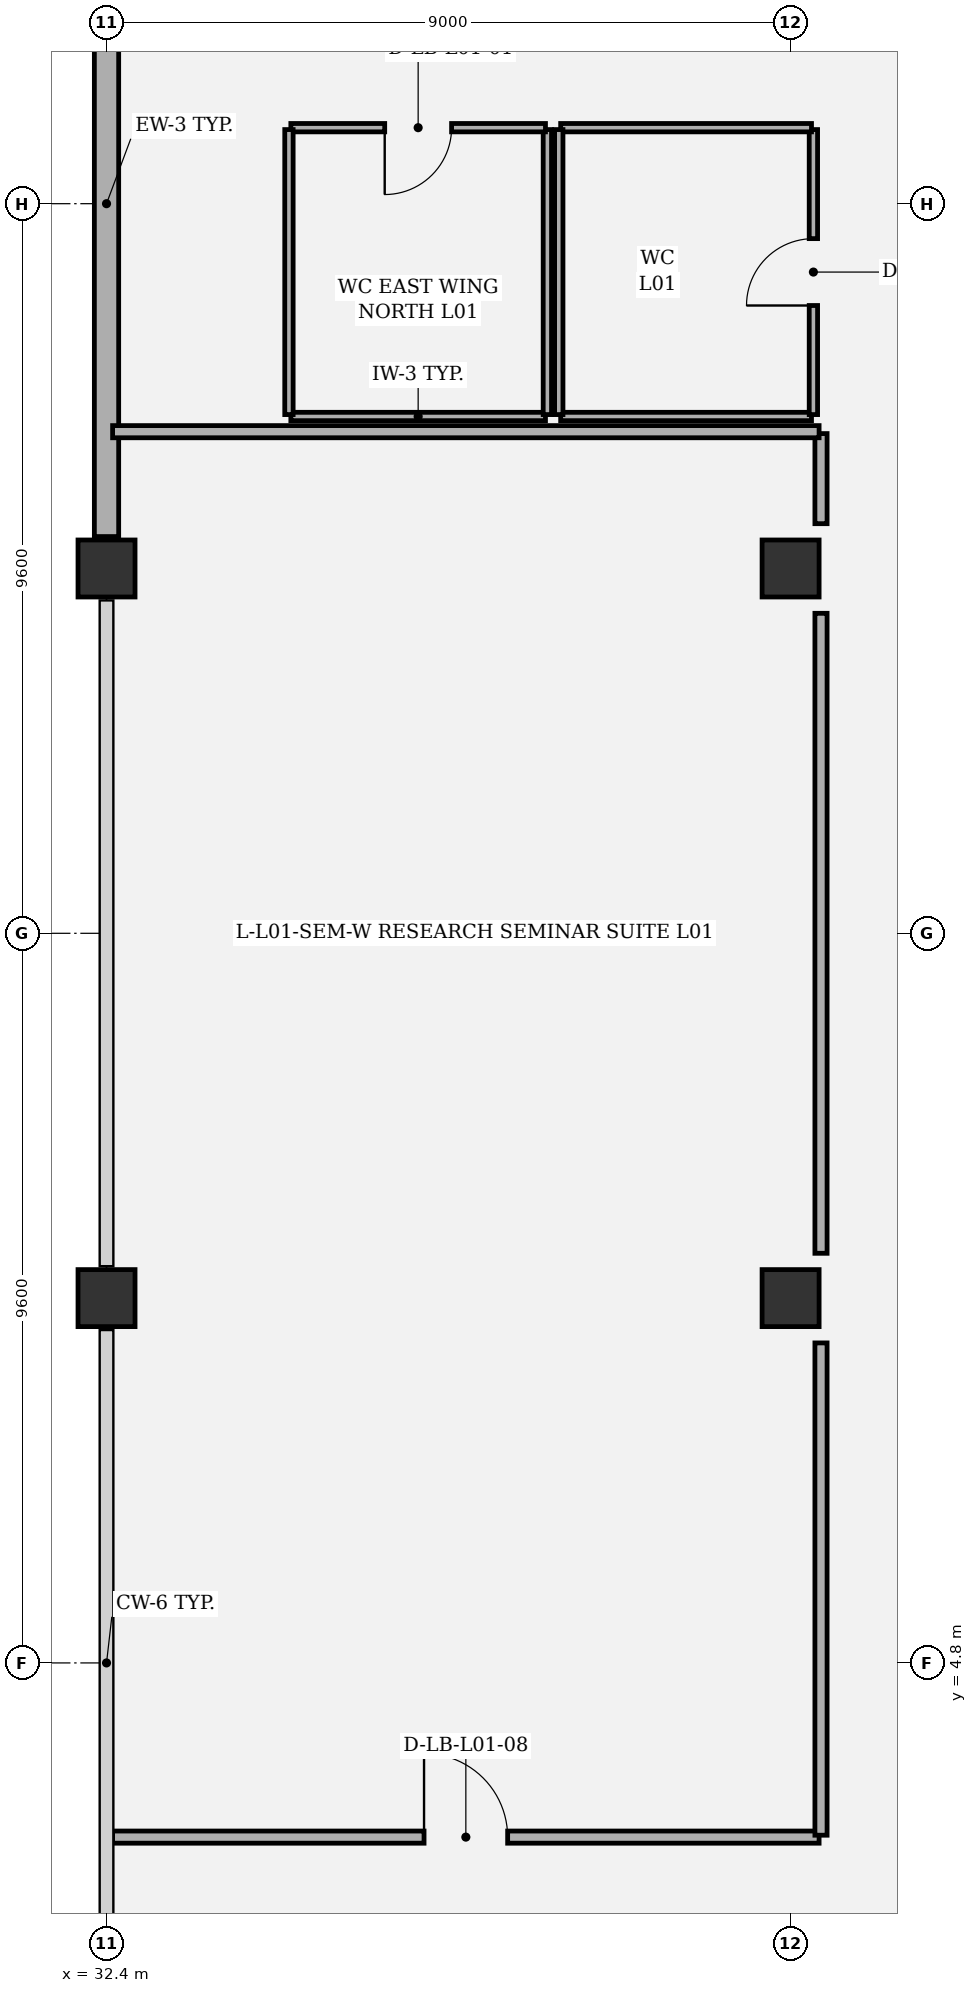
"""IFC4 building model, lengths in metres.
Left out: names, types, materials, properties, quantities, classifications, styles, units other than length and angle.
Written with IfcOpenShell. Run it as: python <this file> out.ifc"""

import sys

from ifc_helpers import new_model, si_unit, direction, frame, frame_2d, origin, origin_2d, place, context, subcontext, project, spatial, rectangle, extrude, element, fill, save


model = new_model("IFC4")
c1 = context("Model", 3, precision=1e-05, world=origin(), true_north=direction((0.0, 1.0)))
c2 = subcontext(c1, "Body", "Model", "MODEL_VIEW")
j1 = project(units=[si_unit("LENGTHUNIT", "METRE"), si_unit("PLANEANGLEUNIT", "RADIAN")], contexts=[c1])
p1 = place(None, origin())
s1 = spatial("IfcSite", under=j1, at=p1, CompositionType="ELEMENT")
p2 = place(p1, origin())
s2 = spatial("IfcBuilding", under=s1, at=p2, CompositionType="ELEMENT")
p3 = place(p2, frame((0.0, 0.0, 6.6)))
s3 = spatial("IfcBuildingStorey", under=s2, at=p3, CompositionType="ELEMENT", Elevation=6.6)
for number, where, z_axis, x_axis in (
    (1, (32.4, 9.6, 0.0), (0.0, 0.0, 1.0), (1.0, 0.0, 0.0)),
    (2, (32.4, 19.2, 0.0), (0.0, 0.0, 1.0), (1.0, 0.0, 0.0)),
    (3, (41.4, 9.6, 0.0), (0.0, 0.0, 1.0), (1.0, 0.0, 0.0)),
    (4, (41.4, 19.2, 0.0), (0.0, 0.0, 1.0), (1.0, 0.0, 0.0)),
):
    element("IfcColumn", number, at=place(p3, frame(where, z_axis=z_axis, x_axis=x_axis)), inside=s3, PredefinedType="COLUMN", context=c2, shape_type="SweptSolid", body=[
        extrude(rectangle(XDim=0.75, YDim=0.75, at=origin_2d()), origin(), (0.0, 0.0, 1.0), 5.4),
    ])
p4 = place(p3, frame((32.4, 19.62, 0.0), z_axis=(0.0, 0.0, 1.0), x_axis=(0.0, 1.0, 0.0)))
e5 = element("IfcWall", 5, at=p4, inside=s3, PredefinedType="SOLIDWALL", context=c2, shape_type="SweptSolid", body=[
    extrude(rectangle(XDim=8.76, YDim=0.32, at=frame_2d((4.38, 0.0))), origin(), (0.0, 0.0, 1.0), 4.337),
])
p5 = place(p3, frame((34.825, 21.2, 0.0), z_axis=(0.0, 0.0, 1.0), x_axis=(1.0, 0.0, 0.0)))
e6 = element("IfcWall", 6, at=p5, inside=s3, PredefinedType="PARTITIONING", context=c2, shape_type="SweptSolid", body=[
    extrude(rectangle(XDim=3.35, YDim=0.11, at=frame_2d((1.675, 0.0))), origin(), (0.0, 0.0, 1.0), 5.14),
])
p6 = place(p3, frame((38.2, 21.225, 0.0), z_axis=(0.0, 0.0, 1.0), x_axis=(0.0, 1.0, 0.0)))
e7 = element("IfcWall", 7, at=p6, inside=s3, PredefinedType="PARTITIONING", context=c2, shape_type="SweptSolid", body=[
    extrude(rectangle(XDim=3.75, YDim=0.11, at=frame_2d((1.875, 0.0))), origin(), (0.0, 0.0, 1.0), 5.14),
])
p7 = place(p3, frame((38.175, 25.0, 0.0), z_axis=(0.0, 0.0, 1.0), x_axis=(-1.0, 0.0, 0.0)))
e8 = element("IfcWall", 8, at=p7, inside=s3, PredefinedType="PARTITIONING", context=c2, shape_type="SweptSolid", body=[
    extrude(rectangle(XDim=3.35, YDim=0.11, at=frame_2d((1.675, 0.0))), origin(), (0.0, 0.0, 1.0), 5.14),
])
p8 = place(p7, frame((1.235, 0.0, 0.0)))
e9 = element("IfcOpeningElement", 9, at=p8, cuts=e8, PredefinedType="OPENING", context=c2, shape_type="SweptSolid", body=[
    extrude(rectangle(XDim=0.88, YDim=2.1, at=frame_2d((0.44, 1.05))), frame((0.0, 0.065, 0.0), z_axis=(0.0, -1.0, 0.0), x_axis=(1.0, 0.0, 0.0)), (0.0, 0.0, 1.0), 0.13),
])
p9 = place(p3, frame((34.8, 24.975, 0.0), z_axis=(0.0, 0.0, 1.0), x_axis=(0.0, -1.0, 0.0)))
e10 = element("IfcWall", 10, at=p9, inside=s3, PredefinedType="PARTITIONING", context=c2, shape_type="SweptSolid", body=[
    extrude(rectangle(XDim=3.75, YDim=0.11, at=frame_2d((1.875, 0.0))), origin(), (0.0, 0.0, 1.0), 5.14),
])
p10 = place(p3, frame((38.375, 21.2, 0.0), z_axis=(0.0, 0.0, 1.0), x_axis=(1.0, 0.0, 0.0)))
e11 = element("IfcWall", 11, at=p10, inside=s3, PredefinedType="PARTITIONING", context=c2, shape_type="SweptSolid", body=[
    extrude(rectangle(XDim=3.3, YDim=0.11, at=frame_2d((1.65, 0.0))), origin(), (0.0, 0.0, 1.0), 5.14),
])
p11 = place(p3, frame((41.7, 21.225, 0.0), z_axis=(0.0, 0.0, 1.0), x_axis=(0.0, 1.0, 0.0)))
e12 = element("IfcWall", 12, at=p11, inside=s3, PredefinedType="PARTITIONING", context=c2, shape_type="SweptSolid", body=[
    extrude(rectangle(XDim=3.75, YDim=0.11, at=frame_2d((1.875, 0.0))), origin(), (0.0, 0.0, 1.0), 4.494),
])
p12 = place(p11, frame((1.435, 0.0, 0.0)))
e13 = element("IfcOpeningElement", 13, at=p12, cuts=e12, PredefinedType="OPENING", context=c2, shape_type="SweptSolid", body=[
    extrude(rectangle(XDim=0.88, YDim=2.1, at=frame_2d((0.44, 1.05))), frame((0.0, 0.065, 0.0), z_axis=(0.0, -1.0, 0.0), x_axis=(1.0, 0.0, 0.0)), (0.0, 0.0, 1.0), 0.13),
])
p13 = place(p3, frame((41.675, 25.0, 0.0), z_axis=(0.0, 0.0, 1.0), x_axis=(-1.0, 0.0, 0.0)))
e14 = element("IfcWall", 14, at=p13, inside=s3, PredefinedType="PARTITIONING", context=c2, shape_type="SweptSolid", body=[
    extrude(rectangle(XDim=3.3, YDim=0.11, at=frame_2d((1.65, 0.0))), origin(), (0.0, 0.0, 1.0), 5.14),
])
p14 = place(p3, frame((38.35, 24.975, 0.0), z_axis=(0.0, 0.0, 1.0), x_axis=(0.0, -1.0, 0.0)))
e15 = element("IfcWall", 15, at=p14, inside=s3, PredefinedType="PARTITIONING", context=c2, shape_type="SweptSolid", body=[
    extrude(rectangle(XDim=3.75, YDim=0.11, at=frame_2d((1.875, 0.0))), origin(), (0.0, 0.0, 1.0), 5.14),
])
p15 = place(p3, frame((32.48, 2.508, 0.0), z_axis=(0.0, 0.0, 1.0), x_axis=(1.0, 0.0, 0.0)))
e16 = element("IfcWall", 16, at=p15, inside=s3, PredefinedType="PARTITIONING", context=c2, shape_type="SweptSolid", body=[
    extrude(rectangle(XDim=9.295, YDim=0.16, at=frame_2d((4.647, 0.0))), origin(), (0.0, 0.0, 1.0), 4.653),
])
p16 = place(p15, frame((4.097, 0.0, 0.0)))
e17 = element("IfcOpeningElement", 17, at=p16, cuts=e16, PredefinedType="OPENING", context=c2, shape_type="SweptSolid", body=[
    extrude(rectangle(XDim=1.1, YDim=2.15, at=frame_2d((0.55, 1.075))), frame((0.0, 0.09, 0.0), z_axis=(0.0, -1.0, 0.0), x_axis=(1.0, 0.0, 0.0)), (0.0, 0.0, 1.0), 0.18),
])
p17 = place(p3, frame((41.8, 2.533, 0.0), z_axis=(0.0, 0.0, 1.0), x_axis=(0.0, 1.0, 0.0)))
e18 = element("IfcWall", 18, at=p17, inside=s3, PredefinedType="PARTITIONING", context=c2, shape_type="SweptSolid", body=[
    extrude(rectangle(XDim=6.477, YDim=0.16, at=frame_2d((3.239, 0.0))), origin(), (0.0, 0.0, 1.0), 5.14),
])
p18 = place(p3, frame((41.8, 10.19, 0.0), z_axis=(0.0, 0.0, 1.0), x_axis=(0.0, 1.0, 0.0)))
e19 = element("IfcWall", 19, at=p18, inside=s3, PredefinedType="PARTITIONING", context=c2, shape_type="SweptSolid", body=[
    extrude(rectangle(XDim=8.421, YDim=0.16, at=frame_2d((4.21, 0.0))), origin(), (0.0, 0.0, 1.0), 5.14),
])
p19 = place(p3, frame((41.8, 19.79, 0.0), z_axis=(0.0, 0.0, 1.0), x_axis=(0.0, 1.0, 0.0)))
e20 = element("IfcWall", 20, at=p19, inside=s3, PredefinedType="PARTITIONING", context=c2, shape_type="SweptSolid", body=[
    extrude(rectangle(XDim=1.186, YDim=0.16, at=frame_2d((0.593, 0.0))), origin(), (0.0, 0.0, 1.0), 5.14),
])
p20 = place(p3, frame((41.775, 21.0, 0.0), z_axis=(0.0, 0.0, 1.0), x_axis=(-1.0, 0.0, 0.0)))
e21 = element("IfcWall", 21, at=p20, inside=s3, PredefinedType="PARTITIONING", context=c2, shape_type="SweptSolid", body=[
    extrude(rectangle(XDim=9.295, YDim=0.16, at=frame_2d((4.647, 0.0))), origin(), (0.0, 0.0, 1.0), 5.14),
])
p21 = place(p8, origin())
e22 = element("IfcDoor", 22, at=p21, inside=s3, OperationType="SINGLE_SWING_RIGHT", PredefinedType="DOOR", context=c2, shape_type="SweptSolid", body=[
    extrude(rectangle(XDim=0.88, YDim=2.1, at=frame_2d((0.44, 1.05))), frame((0.0, 0.025, 0.0), z_axis=(0.0, -1.0, 0.0), x_axis=(1.0, 0.0, 0.0)), (0.0, 0.0, 1.0), 0.05),
])
fill(e9, e22)
p22 = place(p12, origin())
e23 = element("IfcDoor", 23, at=p22, inside=s3, OperationType="SINGLE_SWING_LEFT", PredefinedType="DOOR", context=c2, shape_type="SweptSolid", body=[
    extrude(rectangle(XDim=0.88, YDim=2.1, at=frame_2d((0.44, 1.05))), frame((0.0, 0.025, 0.0), z_axis=(0.0, -1.0, 0.0), x_axis=(1.0, 0.0, 0.0)), (0.0, 0.0, 1.0), 0.05),
])
fill(e13, e23)
p23 = place(p16, origin())
e24 = element("IfcDoor", 24, at=p23, inside=s3, OperationType="SINGLE_SWING_LEFT", PredefinedType="DOOR", context=c2, shape_type="SweptSolid", body=[
    extrude(rectangle(XDim=1.1, YDim=2.15, at=frame_2d((0.55, 1.075))), frame((0.0, 0.025, 0.0), z_axis=(0.0, -1.0, 0.0), x_axis=(1.0, 0.0, 0.0)), (0.0, 0.0, 1.0), 0.05),
])
fill(e17, e24)
save(model, sys.argv[1])
